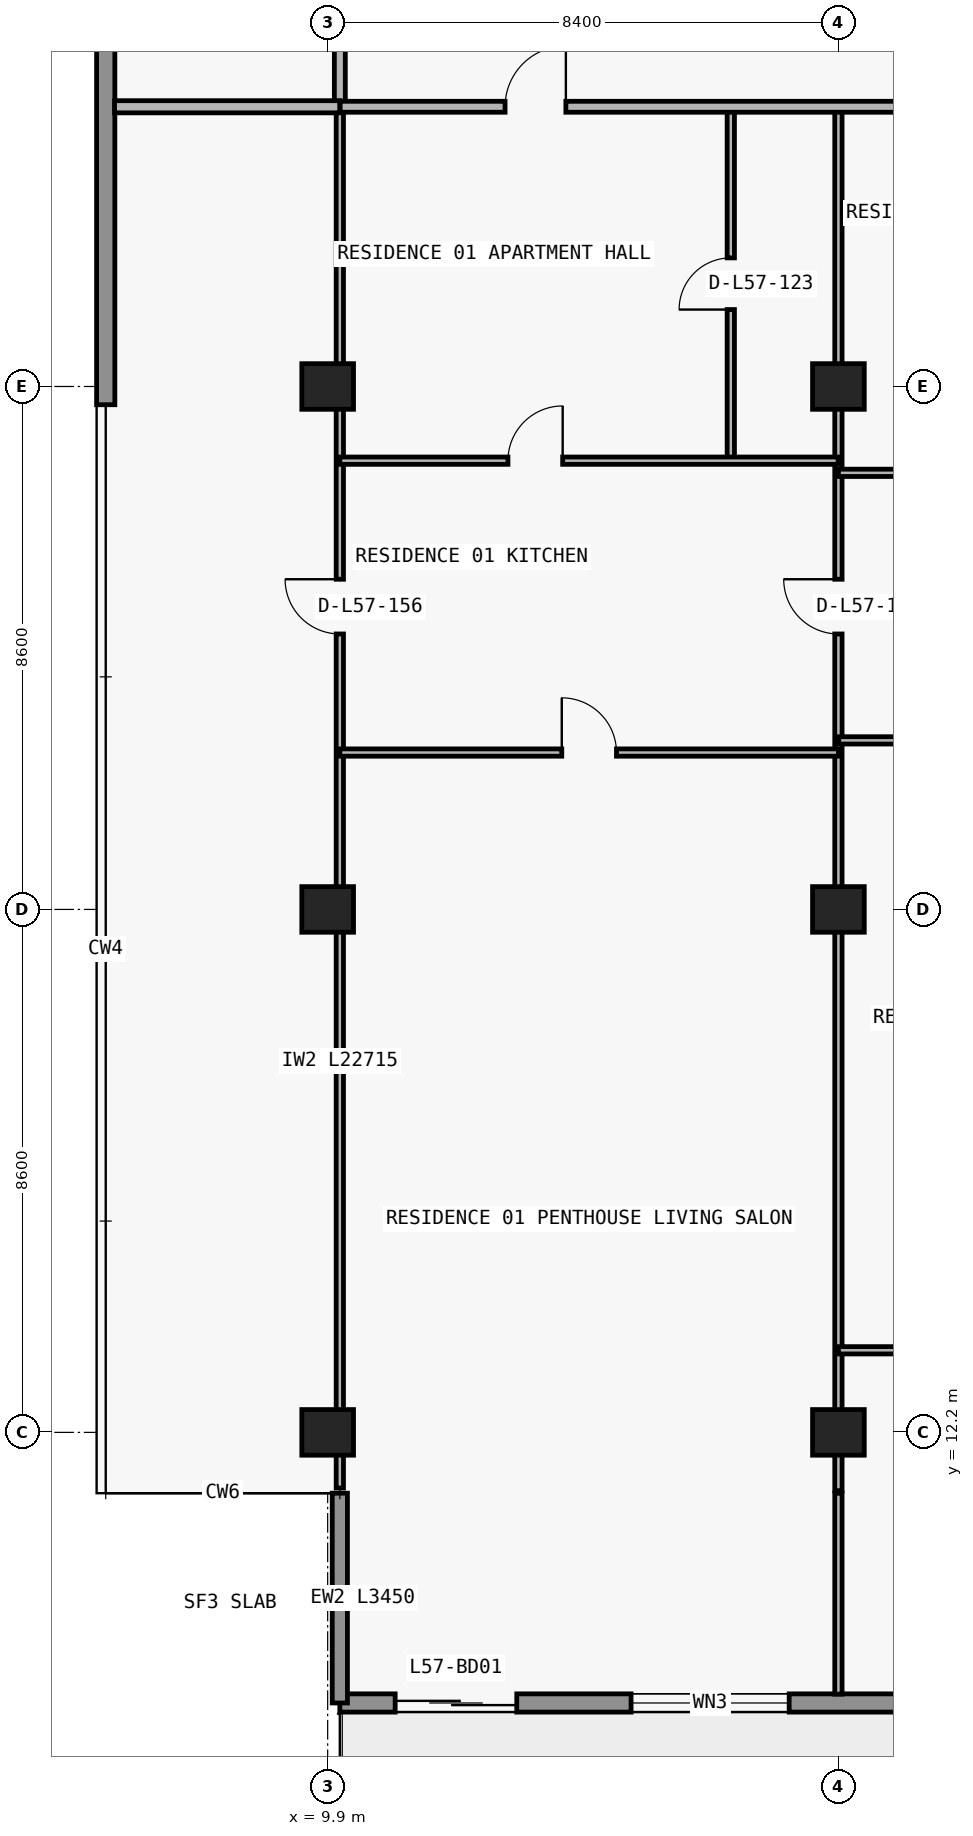
"""IFC4 building model, lengths in metres.
Left out: names, types, materials, properties, quantities, classifications, styles, units other than length and angle.
Written with IfcOpenShell. Run it as: python <this file> out.ifc"""

import sys

from ifc_helpers import new_model, si_unit, direction, frame, frame_2d, origin, origin_2d, place, context, subcontext, project, spatial, rectangle, extrude, element, fill, save


model = new_model("IFC4")
c1 = context("Model", 3, precision=1e-05, world=origin(), true_north=direction((0.0, 1.0)))
c2 = subcontext(c1, "Body", "Model", "MODEL_VIEW")
j1 = project(units=[si_unit("LENGTHUNIT", "METRE"), si_unit("PLANEANGLEUNIT", "RADIAN")], contexts=[c1])
p1 = place(None, origin())
s1 = spatial("IfcSite", under=j1, at=p1, CompositionType="ELEMENT")
p2 = place(p1, origin())
s2 = spatial("IfcBuilding", under=s1, at=p2, CompositionType="ELEMENT")
p3 = place(p2, frame((0.0, 0.0, 204.9)))
s3 = spatial("IfcBuildingStorey", under=s2, at=p3, CompositionType="ELEMENT", Elevation=204.9)
for number, where, z_axis, x_axis in (
    (1, (9.9, 12.2, 0.0), (0.0, 0.0, 1.0), (1.0, 0.0, 0.0)),
    (2, (18.3, 12.2, 0.0), (0.0, 0.0, 1.0), (1.0, 0.0, 0.0)),
    (3, (9.9, 20.8, 0.0), (0.0, 0.0, 1.0), (1.0, 0.0, 0.0)),
    (4, (18.3, 20.8, 0.0), (0.0, 0.0, 1.0), (1.0, 0.0, 0.0)),
    (5, (9.9, 29.4, 0.0), (0.0, 0.0, 1.0), (1.0, 0.0, 0.0)),
    (6, (18.3, 29.4, 0.0), (0.0, 0.0, 1.0), (1.0, 0.0, 0.0)),
):
    element("IfcColumn", number, at=place(p3, frame(where, z_axis=z_axis, x_axis=x_axis)), inside=s3, PredefinedType="COLUMN", context=c2, shape_type="SweptSolid", body=[
        extrude(rectangle(XDim=0.85, YDim=0.75, at=origin_2d()), origin(), (0.0, 0.0, 1.0), 3.05),
    ])
p4 = place(p3, frame((67.7, 7.75, 0.0), z_axis=(0.0, 0.0, 1.0), x_axis=(-1.0, 0.0, 0.0)))
e7 = element("IfcWall", 7, at=p4, inside=s3, PredefinedType="STANDARD", context=c2, shape_type="SweptSolid", body=[
    extrude(rectangle(XDim=57.6, YDim=0.3, at=frame_2d((28.8, 0.0))), origin(), (0.0, 0.0, 1.0), 3.05),
])
p5 = place(p4, frame((54.69, 0.0, 0.0)))
e8 = element("IfcOpeningElement", 8, at=p5, cuts=e7, PredefinedType="OPENING", context=c2, shape_type="SweptSolid", body=[
    extrude(rectangle(XDim=2.0, YDim=2.3, at=frame_2d((1.0, 1.15))), frame((0.0, 0.16, 0.0), z_axis=(0.0, -1.0, 0.0), x_axis=(1.0, 0.0, 0.0)), (0.0, 0.0, 1.0), 0.32),
])
p6 = place(p4, frame((50.21, 0.0, 0.65)))
e9 = element("IfcOpeningElement", 9, at=p6, cuts=e7, PredefinedType="OPENING", context=c2, shape_type="SweptSolid", body=[
    extrude(rectangle(XDim=2.6, YDim=1.85, at=frame_2d((1.3, 0.925))), frame((0.0, 0.16, 0.0), z_axis=(0.0, -1.0, 0.0), x_axis=(1.0, 0.0, 0.0)), (0.0, 0.0, 1.0), 0.32),
])
p7 = place(p4, frame((44.1, 0.0, 0.85)))
e10 = element("IfcOpeningElement", 10, at=p7, cuts=e7, PredefinedType="OPENING", context=c2, shape_type="SweptSolid", body=[
    extrude(rectangle(XDim=2.2, YDim=1.55, at=frame_2d((1.1, 0.775))), frame((0.0, 0.16, 0.0), z_axis=(0.0, -1.0, 0.0), x_axis=(1.0, 0.0, 0.0)), (0.0, 0.0, 1.0), 0.32),
])
p8 = place(p4, frame((38.09, 0.0, 0.0)))
e11 = element("IfcOpeningElement", 11, at=p8, cuts=e7, PredefinedType="OPENING", context=c2, shape_type="SweptSolid", body=[
    extrude(rectangle(XDim=2.0, YDim=2.3, at=frame_2d((1.0, 1.15))), frame((0.0, 0.16, 0.0), z_axis=(0.0, -1.0, 0.0), x_axis=(1.0, 0.0, 0.0)), (0.0, 0.0, 1.0), 0.32),
])
p9 = place(p4, frame((33.41, 0.0, 0.65)))
e12 = element("IfcOpeningElement", 12, at=p9, cuts=e7, PredefinedType="OPENING", context=c2, shape_type="SweptSolid", body=[
    extrude(rectangle(XDim=2.6, YDim=1.85, at=frame_2d((1.3, 0.925))), frame((0.0, 0.16, 0.0), z_axis=(0.0, -1.0, 0.0), x_axis=(1.0, 0.0, 0.0)), (0.0, 0.0, 1.0), 0.32),
])
p10 = place(p4, frame((27.7, 0.0, 0.85)))
e13 = element("IfcOpeningElement", 13, at=p10, cuts=e7, PredefinedType="OPENING", context=c2, shape_type="SweptSolid", body=[
    extrude(rectangle(XDim=2.2, YDim=1.55, at=frame_2d((1.1, 0.775))), frame((0.0, 0.16, 0.0), z_axis=(0.0, -1.0, 0.0), x_axis=(1.0, 0.0, 0.0)), (0.0, 0.0, 1.0), 0.32),
])
p11 = place(p4, frame((19.7, 0.0, 0.85)))
e14 = element("IfcOpeningElement", 14, at=p11, cuts=e7, PredefinedType="OPENING", context=c2, shape_type="SweptSolid", body=[
    extrude(rectangle(XDim=2.2, YDim=1.55, at=frame_2d((1.1, 0.775))), frame((0.0, 0.16, 0.0), z_axis=(0.0, -1.0, 0.0), x_axis=(1.0, 0.0, 0.0)), (0.0, 0.0, 1.0), 0.32),
])
p12 = place(p4, frame((13.69, 0.0, 0.0)))
e15 = element("IfcOpeningElement", 15, at=p12, cuts=e7, PredefinedType="OPENING", context=c2, shape_type="SweptSolid", body=[
    extrude(rectangle(XDim=2.0, YDim=2.3, at=frame_2d((1.0, 1.15))), frame((0.0, 0.16, 0.0), z_axis=(0.0, -1.0, 0.0), x_axis=(1.0, 0.0, 0.0)), (0.0, 0.0, 1.0), 0.32),
])
p13 = place(p4, frame((9.01, 0.0, 0.65)))
e16 = element("IfcOpeningElement", 16, at=p13, cuts=e7, PredefinedType="OPENING", context=c2, shape_type="SweptSolid", body=[
    extrude(rectangle(XDim=2.6, YDim=1.85, at=frame_2d((1.3, 0.925))), frame((0.0, 0.16, 0.0), z_axis=(0.0, -1.0, 0.0), x_axis=(1.0, 0.0, 0.0)), (0.0, 0.0, 1.0), 0.32),
])
p14 = place(p4, frame((3.0, 0.0, 0.85)))
e17 = element("IfcOpeningElement", 17, at=p14, cuts=e7, PredefinedType="OPENING", context=c2, shape_type="SweptSolid", body=[
    extrude(rectangle(XDim=2.2, YDim=1.55, at=frame_2d((1.1, 0.775))), frame((0.0, 0.16, 0.0), z_axis=(0.0, -1.0, 0.0), x_axis=(1.0, 0.0, 0.0)), (0.0, 0.0, 1.0), 0.32),
])
p15 = place(p3, frame((10.1, 11.2, 0.0), z_axis=(0.0, 0.0, 1.0), x_axis=(0.0, -1.0, 0.0)))
e18 = element("IfcWall", 18, at=p15, inside=s3, PredefinedType="ELEMENTEDWALL", context=c2, shape_type="SweptSolid", body=[
    extrude(rectangle(XDim=3.45, YDim=0.25, at=frame_2d((1.725, 0.0))), origin(), (0.0, 0.0, 1.0), 3.05),
])
p16 = place(p3, frame((6.25, 29.1, 0.0), z_axis=(0.0, 0.0, 1.0), x_axis=(0.0, 1.0, 0.0)))
e19 = element("IfcWall", 19, at=p16, inside=s3, PredefinedType="STANDARD", context=c2, shape_type="SweptSolid", body=[
    extrude(rectangle(XDim=17.9, YDim=0.3, at=frame_2d((8.95, 0.0))), origin(), (0.0, 0.0, 1.0), 3.05),
])
p17 = place(p3, frame((10.1, 11.285, 0.0), z_axis=(0.0, 0.0, 1.0), x_axis=(0.0, 1.0, 0.0)))
e20 = element("IfcWall", 20, at=p17, inside=s3, PredefinedType="PARTITIONING", context=c2, shape_type="SweptSolid", body=[
    extrude(rectangle(XDim=22.715, YDim=0.12, at=frame_2d((11.357, 0.0))), origin(), (0.0, 0.0, 1.0), 2.263),
])
p18 = place(p17, frame((14.045, 0.0, 0.0)))
e21 = element("IfcOpeningElement", 21, at=p18, cuts=e20, PredefinedType="OPENING", context=c2, shape_type="SweptSolid", body=[
    extrude(rectangle(XDim=0.9, YDim=2.15, at=frame_2d((0.45, 1.075))), frame((0.0, 0.07, 0.0), z_axis=(0.0, -1.0, 0.0), x_axis=(1.0, 0.0, 0.0)), (0.0, 0.0, 1.0), 0.14),
])
p19 = place(p3, frame((10.1, 34.005, 0.0), z_axis=(0.0, 0.0, 1.0), x_axis=(0.0, 1.0, 0.0)))
e22 = element("IfcWall", 22, at=p19, inside=s3, PredefinedType="PARTITIONING", context=c2, shape_type="SweptSolid", body=[
    extrude(rectangle(XDim=2.995, YDim=0.18, at=frame_2d((1.498, 0.0))), origin(), (0.0, 0.0, 1.0), 2.263),
])
p20 = place(p3, frame((16.53, 28.18, 0.0), z_axis=(0.0, 0.0, 1.0), x_axis=(0.0, 1.0, 0.0)))
e23 = element("IfcWall", 23, at=p20, inside=s3, PredefinedType="PARTITIONING", context=c2, shape_type="SweptSolid", body=[
    extrude(rectangle(XDim=5.82, YDim=0.12, at=frame_2d((2.91, 0.0))), origin(), (0.0, 0.0, 1.0), 3.05),
])
p21 = place(p20, frame((2.485, 0.0, 0.0)))
e24 = element("IfcOpeningElement", 24, at=p21, cuts=e23, PredefinedType="OPENING", context=c2, shape_type="SweptSolid", body=[
    extrude(rectangle(XDim=0.85, YDim=2.1, at=frame_2d((0.425, 1.05))), frame((0.0, 0.07, 0.0), z_axis=(0.0, -1.0, 0.0), x_axis=(1.0, 0.0, 0.0)), (0.0, 0.0, 1.0), 0.14),
])
p22 = place(p3, frame((18.3, 7.895, 0.0), z_axis=(0.0, 0.0, 1.0), x_axis=(0.0, 1.0, 0.0)))
e25 = element("IfcWall", 25, at=p22, inside=s3, PredefinedType="PARTITIONING", context=c2, shape_type="SweptSolid", body=[
    extrude(rectangle(XDim=3.305, YDim=0.12, at=frame_2d((1.652, 0.0))), origin(), (0.0, 0.0, 1.0), 3.05),
])
p23 = place(p3, frame((18.3, 11.24, 0.0), z_axis=(0.0, 0.0, 1.0), x_axis=(0.0, 1.0, 0.0)))
e26 = element("IfcWall", 26, at=p23, inside=s3, PredefinedType="PARTITIONING", context=c2, shape_type="SweptSolid", body=[
    extrude(rectangle(XDim=22.76, YDim=0.12, at=frame_2d((11.38, 0.0))), origin(), (0.0, 0.0, 1.0), 2.263),
])
p24 = place(p23, frame((14.09, 0.0, 0.0)))
e27 = element("IfcOpeningElement", 27, at=p24, cuts=e26, PredefinedType="OPENING", context=c2, shape_type="SweptSolid", body=[
    extrude(rectangle(XDim=0.9, YDim=2.15, at=frame_2d((0.45, 1.075))), frame((0.0, 0.07, 0.0), z_axis=(0.0, -1.0, 0.0), x_axis=(1.0, 0.0, 0.0)), (0.0, 0.0, 1.0), 0.14),
])
p25 = place(p3, frame((18.3, 13.55, 0.0), z_axis=(0.0, 0.0, 1.0), x_axis=(1.0, 0.0, 0.0)))
e28 = element("IfcWall", 28, at=p25, inside=s3, PredefinedType="PARTITIONING", context=c2, shape_type="SweptSolid", body=[
    extrude(rectangle(XDim=8.4, YDim=0.12, at=frame_2d((4.2, 0.0))), origin(), (0.0, 0.0, 1.0), 3.05),
])
p26 = place(p25, frame((3.75, 0.0, 0.0)))
e29 = element("IfcOpeningElement", 29, at=p26, cuts=e28, PredefinedType="OPENING", context=c2, shape_type="SweptSolid", body=[
    extrude(rectangle(XDim=0.9, YDim=2.15, at=frame_2d((0.45, 1.075))), frame((0.0, 0.07, 0.0), z_axis=(0.0, -1.0, 0.0), x_axis=(1.0, 0.0, 0.0)), (0.0, 0.0, 1.0), 0.14),
])
p27 = place(p3, frame((10.1, 23.38, 0.0), z_axis=(0.0, 0.0, 1.0), x_axis=(1.0, 0.0, 0.0)))
e30 = element("IfcWall", 30, at=p27, inside=s3, PredefinedType="PARTITIONING", context=c2, shape_type="SweptSolid", body=[
    extrude(rectangle(XDim=8.2, YDim=0.12, at=frame_2d((4.1, 0.0))), origin(), (0.0, 0.0, 1.0), 3.05),
])
p28 = place(p27, frame((3.65, 0.0, 0.0)))
e31 = element("IfcOpeningElement", 31, at=p28, cuts=e30, PredefinedType="OPENING", context=c2, shape_type="SweptSolid", body=[
    extrude(rectangle(XDim=0.9, YDim=2.15, at=frame_2d((0.45, 1.075))), frame((0.0, 0.07, 0.0), z_axis=(0.0, -1.0, 0.0), x_axis=(1.0, 0.0, 0.0)), (0.0, 0.0, 1.0), 0.14),
])
p29 = place(p3, frame((18.305, 23.58, 0.0), z_axis=(0.0, 0.0, 1.0), x_axis=(1.0, 0.0, 0.0)))
e32 = element("IfcWall", 32, at=p29, inside=s3, PredefinedType="PARTITIONING", context=c2, shape_type="SweptSolid", body=[
    extrude(rectangle(XDim=8.175, YDim=0.12, at=frame_2d((4.087, 0.0))), origin(), (0.0, 0.0, 1.0), 3.05),
])
p30 = place(p29, frame((3.637, 0.0, 0.0)))
e33 = element("IfcOpeningElement", 33, at=p30, cuts=e32, PredefinedType="OPENING", context=c2, shape_type="SweptSolid", body=[
    extrude(rectangle(XDim=0.9, YDim=2.15, at=frame_2d((0.45, 1.075))), frame((0.0, 0.07, 0.0), z_axis=(0.0, -1.0, 0.0), x_axis=(1.0, 0.0, 0.0)), (0.0, 0.0, 1.0), 0.14),
])
p31 = place(p3, frame((18.3, 27.98, 0.0), z_axis=(0.0, 0.0, 1.0), x_axis=(1.0, 0.0, 0.0)))
e34 = element("IfcWall", 34, at=p31, inside=s3, PredefinedType="PARTITIONING", context=c2, shape_type="SweptSolid", body=[
    extrude(rectangle(XDim=8.18, YDim=0.12, at=frame_2d((4.09, 0.0))), origin(), (0.0, 0.0, 1.0), 3.05),
])
p32 = place(p31, frame((2.952, 0.0, 0.0)))
e35 = element("IfcOpeningElement", 35, at=p32, cuts=e34, PredefinedType="OPENING", context=c2, shape_type="SweptSolid", body=[
    extrude(rectangle(XDim=0.9, YDim=2.15, at=frame_2d((0.45, 1.075))), frame((0.0, 0.07, 0.0), z_axis=(0.0, -1.0, 0.0), x_axis=(1.0, 0.0, 0.0)), (0.0, 0.0, 1.0), 0.14),
])
p33 = place(p3, frame((10.1, 28.18, 0.0), z_axis=(0.0, 0.0, 1.0), x_axis=(1.0, 0.0, 0.0)))
e36 = element("IfcWall", 36, at=p33, inside=s3, PredefinedType="PARTITIONING", context=c2, shape_type="SweptSolid", body=[
    extrude(rectangle(XDim=8.195, YDim=0.12, at=frame_2d((4.097, 0.0))), origin(), (0.0, 0.0, 1.0), 3.05),
])
p34 = place(p33, frame((2.765, 0.0, 0.0)))
e37 = element("IfcOpeningElement", 37, at=p34, cuts=e36, PredefinedType="OPENING", context=c2, shape_type="SweptSolid", body=[
    extrude(rectangle(XDim=0.9, YDim=2.15, at=frame_2d((0.45, 1.075))), frame((0.0, 0.07, 0.0), z_axis=(0.0, -1.0, 0.0), x_axis=(1.0, 0.0, 0.0)), (0.0, 0.0, 1.0), 0.14),
])
p35 = place(p3, frame((6.395, 34.0, 0.0), z_axis=(0.0, 0.0, 1.0), x_axis=(1.0, 0.0, 0.0)))
e38 = element("IfcWall", 38, at=p35, inside=s3, PredefinedType="PARTITIONING", context=c2, shape_type="SweptSolid", body=[
    extrude(rectangle(XDim=3.705, YDim=0.2, at=frame_2d((1.853, 0.0))), origin(), (0.0, 0.0, 1.0), 3.05),
])
p36 = place(p3, frame((10.105, 34.0, 0.0), z_axis=(0.0, 0.0, 1.0), x_axis=(1.0, 0.0, 0.0)))
e39 = element("IfcWall", 39, at=p36, inside=s3, PredefinedType="PARTITIONING", context=c2, shape_type="SweptSolid", body=[
    extrude(rectangle(XDim=57.595, YDim=0.18, at=frame_2d((28.797, 0.0))), origin(), (0.0, 0.0, 1.0), 3.05),
])
p37 = place(p36, frame((2.712, 0.0, 0.0)))
e40 = element("IfcOpeningElement", 40, at=p37, cuts=e39, PredefinedType="OPENING", context=c2, shape_type="SweptSolid", body=[
    extrude(rectangle(XDim=1.0, YDim=2.2, at=frame_2d((0.5, 1.1))), frame((0.0, 0.1, 0.0), z_axis=(0.0, -1.0, 0.0), x_axis=(1.0, 0.0, 0.0)), (0.0, 0.0, 1.0), 0.2),
])
p38 = place(p36, frame((19.391, 0.0, 0.0)))
e41 = element("IfcOpeningElement", 41, at=p38, cuts=e39, PredefinedType="OPENING", context=c2, shape_type="SweptSolid", body=[
    extrude(rectangle(XDim=1.0, YDim=2.2, at=frame_2d((0.5, 1.1))), frame((0.0, 0.1, 0.0), z_axis=(0.0, -1.0, 0.0), x_axis=(1.0, 0.0, 0.0)), (0.0, 0.0, 1.0), 0.2),
])
p39 = place(p36, frame((43.794, 0.0, 0.0)))
e42 = element("IfcOpeningElement", 42, at=p39, cuts=e39, PredefinedType="OPENING", context=c2, shape_type="SweptSolid", body=[
    extrude(rectangle(XDim=1.0, YDim=2.2, at=frame_2d((0.5, 1.1))), frame((0.0, 0.1, 0.0), z_axis=(0.0, -1.0, 0.0), x_axis=(1.0, 0.0, 0.0)), (0.0, 0.0, 1.0), 0.2),
])
p40 = place(p5, origin())
e43 = element("IfcDoor", 43, at=p40, inside=s3, OperationType="DOUBLE_DOOR_SLIDING", PredefinedType="DOOR", context=c2, shape_type="SweptSolid", body=[
    extrude(rectangle(XDim=2.0, YDim=2.3, at=frame_2d((1.0, 1.15))), frame((0.0, 0.025, 0.0), z_axis=(0.0, -1.0, 0.0), x_axis=(1.0, 0.0, 0.0)), (0.0, 0.0, 1.0), 0.05),
])
fill(e8, e43)
p41 = place(p6, origin())
e44 = element("IfcWindow", 44, at=p41, inside=s3, PartitioningType="SINGLE_PANEL", PredefinedType="WINDOW", context=c2, shape_type="SweptSolid", body=[
    extrude(rectangle(XDim=2.6, YDim=1.85, at=frame_2d((1.3, 0.925))), frame((0.0, 0.03, 0.0), z_axis=(0.0, -1.0, 0.0), x_axis=(1.0, 0.0, 0.0)), (0.0, 0.0, 1.0), 0.06),
])
fill(e9, e44)
p42 = place(p37, origin())
e45 = element("IfcDoor", 45, at=p42, inside=s3, OperationType="SINGLE_SWING_RIGHT", PredefinedType="DOOR", context=c2, shape_type="SweptSolid", body=[
    extrude(rectangle(XDim=1.0, YDim=2.2, at=frame_2d((0.5, 1.1))), frame((0.0, 0.025, 0.0), z_axis=(0.0, -1.0, 0.0), x_axis=(1.0, 0.0, 0.0)), (0.0, 0.0, 1.0), 0.05),
])
fill(e40, e45)
p43 = place(p21, origin())
e46 = element("IfcDoor", 46, at=p43, inside=s3, OperationType="SINGLE_SWING_LEFT", PredefinedType="DOOR", context=c2, shape_type="SweptSolid", body=[
    extrude(rectangle(XDim=0.85, YDim=2.1, at=frame_2d((0.425, 1.05))), frame((0.0, 0.025, 0.0), z_axis=(0.0, -1.0, 0.0), x_axis=(1.0, 0.0, 0.0)), (0.0, 0.0, 1.0), 0.05),
])
fill(e24, e46)
p44 = place(p34, origin())
e47 = element("IfcDoor", 47, at=p44, inside=s3, OperationType="SINGLE_SWING_RIGHT", PredefinedType="DOOR", context=c2, shape_type="SweptSolid", body=[
    extrude(rectangle(XDim=0.9, YDim=2.15, at=frame_2d((0.45, 1.075))), frame((0.0, 0.025, 0.0), z_axis=(0.0, -1.0, 0.0), x_axis=(1.0, 0.0, 0.0)), (0.0, 0.0, 1.0), 0.05),
])
fill(e37, e47)
p45 = place(p28, origin())
e48 = element("IfcDoor", 48, at=p45, inside=s3, OperationType="SINGLE_SWING_LEFT", PredefinedType="DOOR", context=c2, shape_type="SweptSolid", body=[
    extrude(rectangle(XDim=0.9, YDim=2.15, at=frame_2d((0.45, 1.075))), frame((0.0, 0.025, 0.0), z_axis=(0.0, -1.0, 0.0), x_axis=(1.0, 0.0, 0.0)), (0.0, 0.0, 1.0), 0.05),
])
fill(e31, e48)
p46 = place(p24, origin())
e49 = element("IfcDoor", 49, at=p46, inside=s3, OperationType="SINGLE_SWING_RIGHT", PredefinedType="DOOR", context=c2, shape_type="SweptSolid", body=[
    extrude(rectangle(XDim=0.9, YDim=2.15, at=frame_2d((0.45, 1.075))), frame((0.0, 0.025, 0.0), z_axis=(0.0, -1.0, 0.0), x_axis=(1.0, 0.0, 0.0)), (0.0, 0.0, 1.0), 0.05),
])
fill(e27, e49)
p47 = place(p18, origin())
e50 = element("IfcDoor", 50, at=p47, inside=s3, OperationType="SINGLE_SWING_RIGHT", PredefinedType="DOOR", context=c2, shape_type="SweptSolid", body=[
    extrude(rectangle(XDim=0.9, YDim=2.15, at=frame_2d((0.45, 1.075))), frame((0.0, 0.025, 0.0), z_axis=(0.0, -1.0, 0.0), x_axis=(1.0, 0.0, 0.0)), (0.0, 0.0, 1.0), 0.05),
])
fill(e21, e50)
save(model, sys.argv[1])
